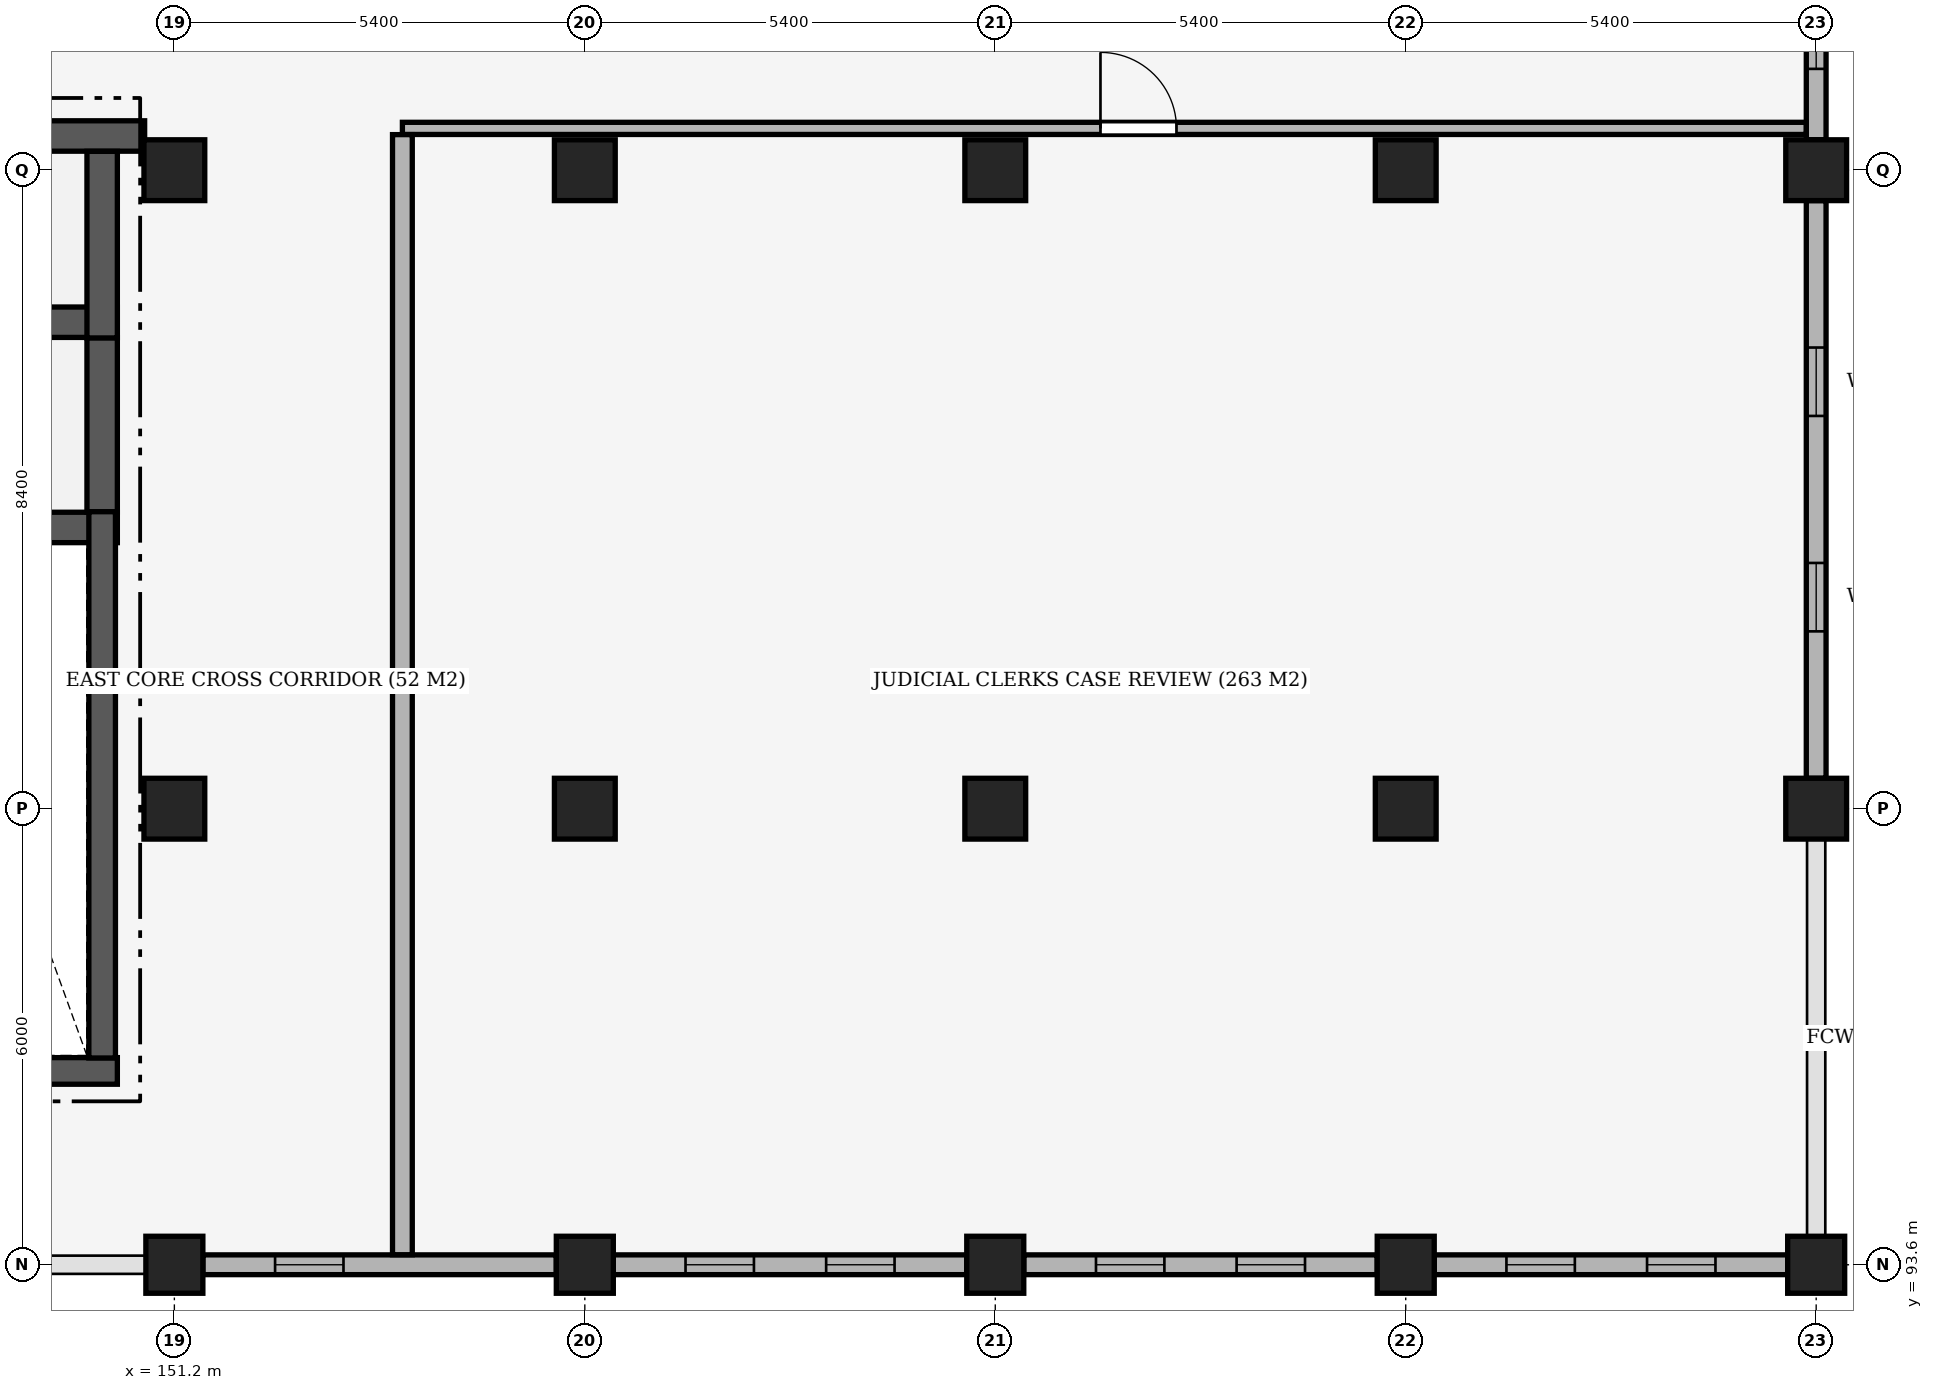
"""IFC4 building model, lengths in metres.
Left out: names, types, materials, properties, quantities, classifications, styles, units other than length and angle.
Written with IfcOpenShell. Run it as: python <this file> out.ifc"""

import sys

from ifc_helpers import new_model, si_unit, direction, frame, frame_2d, origin, origin_2d, place, context, subcontext, project, spatial, rectangle, extrude, element, fill, save


model = new_model("IFC4")
c1 = context("Model", 3, precision=1e-05, world=origin(), true_north=direction((0.0, 1.0)))
c2 = subcontext(c1, "Body", "Model", "MODEL_VIEW")
j1 = project(units=[si_unit("LENGTHUNIT", "METRE"), si_unit("PLANEANGLEUNIT", "RADIAN")], contexts=[c1])
p1 = place(None, origin())
s1 = spatial("IfcSite", under=j1, at=p1, CompositionType="ELEMENT")
p2 = place(p1, origin())
s2 = spatial("IfcBuilding", under=s1, at=p2, CompositionType="ELEMENT")
p3 = place(p2, frame((0.0, 0.0, 15.3)))
s3 = spatial("IfcBuildingStorey", under=s2, at=p3, CompositionType="ELEMENT", Elevation=15.3)
p4 = place(p3, frame((151.2, 93.6, 0.0), z_axis=(0.0, 0.0, 1.0), x_axis=(1.0, 0.0, 0.0)))
e1 = element("IfcColumn", 1, at=p4, inside=s3, PredefinedType="COLUMN", context=c2, shape_type="SweptSolid", body=[
    extrude(rectangle(XDim=0.75, YDim=0.75, at=origin_2d()), origin(), (0.0, 0.0, 1.0), 5.1),
])
for number, where, z_axis, x_axis in (
    (2, (151.2, 99.6, 0.0), (0.0, 0.0, 1.0), (1.0, 0.0, 0.0)),
    (3, (151.2, 108.0, 0.0), (0.0, 0.0, 1.0), (1.0, 0.0, 0.0)),
):
    element("IfcColumn", number, at=place(p3, frame(where, z_axis=z_axis, x_axis=x_axis)), inside=s3, PredefinedType="COLUMN", context=c2, shape_type="SweptSolid", body=[
        extrude(rectangle(XDim=0.8, YDim=0.8, at=origin_2d()), origin(), (0.0, 0.0, 1.0), 5.1),
    ])
p5 = place(p3, frame((156.6, 93.6, 0.0), z_axis=(0.0, 0.0, 1.0), x_axis=(1.0, 0.0, 0.0)))
e4 = element("IfcColumn", 4, at=p5, inside=s3, PredefinedType="COLUMN", context=c2, shape_type="SweptSolid", body=[
    extrude(rectangle(XDim=0.75, YDim=0.75, at=origin_2d()), origin(), (0.0, 0.0, 1.0), 5.1),
])
for number, where, z_axis, x_axis in (
    (5, (156.6, 99.6, 0.0), (0.0, 0.0, 1.0), (1.0, 0.0, 0.0)),
    (6, (156.6, 108.0, 0.0), (0.0, 0.0, 1.0), (1.0, 0.0, 0.0)),
):
    element("IfcColumn", number, at=place(p3, frame(where, z_axis=z_axis, x_axis=x_axis)), inside=s3, PredefinedType="COLUMN", context=c2, shape_type="SweptSolid", body=[
        extrude(rectangle(XDim=0.8, YDim=0.8, at=origin_2d()), origin(), (0.0, 0.0, 1.0), 5.1),
    ])
p6 = place(p3, frame((162.0, 93.6, 0.0), z_axis=(0.0, 0.0, 1.0), x_axis=(1.0, 0.0, 0.0)))
e7 = element("IfcColumn", 7, at=p6, inside=s3, PredefinedType="COLUMN", context=c2, shape_type="SweptSolid", body=[
    extrude(rectangle(XDim=0.75, YDim=0.75, at=origin_2d()), origin(), (0.0, 0.0, 1.0), 5.1),
])
for number, where, z_axis, x_axis in (
    (8, (162.0, 99.6, 0.0), (0.0, 0.0, 1.0), (1.0, 0.0, 0.0)),
    (9, (162.0, 108.0, 0.0), (0.0, 0.0, 1.0), (1.0, 0.0, 0.0)),
):
    element("IfcColumn", number, at=place(p3, frame(where, z_axis=z_axis, x_axis=x_axis)), inside=s3, PredefinedType="COLUMN", context=c2, shape_type="SweptSolid", body=[
        extrude(rectangle(XDim=0.8, YDim=0.8, at=origin_2d()), origin(), (0.0, 0.0, 1.0), 5.1),
    ])
p7 = place(p3, frame((167.4, 93.6, 0.0), z_axis=(0.0, 0.0, 1.0), x_axis=(1.0, 0.0, 0.0)))
e10 = element("IfcColumn", 10, at=p7, inside=s3, PredefinedType="COLUMN", context=c2, shape_type="SweptSolid", body=[
    extrude(rectangle(XDim=0.75, YDim=0.75, at=origin_2d()), origin(), (0.0, 0.0, 1.0), 5.1),
])
for number, where, z_axis, x_axis in (
    (11, (167.4, 99.6, 0.0), (0.0, 0.0, 1.0), (1.0, 0.0, 0.0)),
    (12, (167.4, 108.0, 0.0), (0.0, 0.0, 1.0), (1.0, 0.0, 0.0)),
):
    element("IfcColumn", number, at=place(p3, frame(where, z_axis=z_axis, x_axis=x_axis)), inside=s3, PredefinedType="COLUMN", context=c2, shape_type="SweptSolid", body=[
        extrude(rectangle(XDim=0.8, YDim=0.8, at=origin_2d()), origin(), (0.0, 0.0, 1.0), 5.1),
    ])
p8 = place(p3, frame((172.8, 93.6, 0.0), z_axis=(0.0, 0.0, 1.0), x_axis=(1.0, 0.0, 0.0)))
e13 = element("IfcColumn", 13, at=p8, inside=s3, PredefinedType="COLUMN", context=c2, shape_type="SweptSolid", body=[
    extrude(rectangle(XDim=0.75, YDim=0.75, at=origin_2d()), origin(), (0.0, 0.0, 1.0), 5.1),
])
for number, where, z_axis, x_axis in (
    (14, (172.8, 99.6, 0.0), (0.0, 0.0, 1.0), (1.0, 0.0, 0.0)),
    (15, (172.8, 108.0, 0.0), (0.0, 0.0, 1.0), (1.0, 0.0, 0.0)),
):
    element("IfcColumn", number, at=place(p3, frame(where, z_axis=z_axis, x_axis=x_axis)), inside=s3, PredefinedType="COLUMN", context=c2, shape_type="SweptSolid", body=[
        extrude(rectangle(XDim=0.8, YDim=0.8, at=origin_2d()), origin(), (0.0, 0.0, 1.0), 5.1),
    ])
p9 = place(p3, frame((172.8, 113.0, 0.0), z_axis=(0.0, 0.0, 1.0), x_axis=(0.0, -1.0, 0.0)))
e16 = element("IfcWall", 16, at=p9, inside=s3, PredefinedType="SOLIDWALL", context=c2, shape_type="SweptSolid", body=[
    extrude(rectangle(XDim=4.6, YDim=0.26, at=frame_2d((2.3, 0.0))), origin(), (0.0, 0.0, 1.0), 4.29),
])
p10 = place(p9, frame((0.933, 0.0, 0.9)))
e17 = element("IfcOpeningElement", 17, at=p10, cuts=e16, PredefinedType="OPENING", context=c2, shape_type="SweptSolid", body=[
    extrude(rectangle(XDim=0.9, YDim=2.2, at=frame_2d((0.45, 1.1))), frame((0.0, 0.145, 0.0), z_axis=(0.0, -1.0, 0.0), x_axis=(1.0, 0.0, 0.0)), (0.0, 0.0, 1.0), 0.29),
])
p11 = place(p9, frame((2.767, 0.0, 0.9)))
e18 = element("IfcOpeningElement", 18, at=p11, cuts=e16, PredefinedType="OPENING", context=c2, shape_type="SweptSolid", body=[
    extrude(rectangle(XDim=0.9, YDim=2.2, at=frame_2d((0.45, 1.1))), frame((0.0, 0.145, 0.0), z_axis=(0.0, -1.0, 0.0), x_axis=(1.0, 0.0, 0.0)), (0.0, 0.0, 1.0), 0.29),
])
p12 = place(p3, frame((172.8, 107.6, 0.0), z_axis=(0.0, 0.0, 1.0), x_axis=(0.0, -1.0, 0.0)))
e19 = element("IfcWall", 19, at=p12, inside=s3, PredefinedType="SOLIDWALL", context=c2, shape_type="SweptSolid", body=[
    extrude(rectangle(XDim=7.6, YDim=0.26, at=frame_2d((3.8, 0.0))), origin(), (0.0, 0.0, 1.0), 4.14),
])
p13 = place(p12, frame((1.933, 0.0, 0.9)))
e20 = element("IfcOpeningElement", 20, at=p13, cuts=e19, PredefinedType="OPENING", context=c2, shape_type="SweptSolid", body=[
    extrude(rectangle(XDim=0.9, YDim=2.2, at=frame_2d((0.45, 1.1))), frame((0.0, 0.145, 0.0), z_axis=(0.0, -1.0, 0.0), x_axis=(1.0, 0.0, 0.0)), (0.0, 0.0, 1.0), 0.29),
])
p14 = place(p12, frame((4.767, 0.0, 0.9)))
e21 = element("IfcOpeningElement", 21, at=p14, cuts=e19, PredefinedType="OPENING", context=c2, shape_type="SweptSolid", body=[
    extrude(rectangle(XDim=0.9, YDim=2.2, at=frame_2d((0.45, 1.1))), frame((0.0, 0.145, 0.0), z_axis=(0.0, -1.0, 0.0), x_axis=(1.0, 0.0, 0.0)), (0.0, 0.0, 1.0), 0.29),
])
p15 = place(p3, frame((172.425, 93.6, 0.0), z_axis=(0.0, 0.0, 1.0), x_axis=(-1.0, 0.0, 0.0)))
e22 = element("IfcWall", 22, at=p15, inside=s3, PredefinedType="SOLIDWALL", context=c2, shape_type="SweptSolid", body=[
    extrude(rectangle(XDim=4.65, YDim=0.26, at=frame_2d((2.325, 0.0))), origin(), (0.0, 0.0, 1.0), 4.24),
])
p16 = place(p15, frame((0.95, 0.0, 0.9)))
e23 = element("IfcOpeningElement", 23, at=p16, cuts=e22, PredefinedType="OPENING", context=c2, shape_type="SweptSolid", body=[
    extrude(rectangle(XDim=0.9, YDim=2.2, at=frame_2d((0.45, 1.1))), frame((0.0, 0.145, 0.0), z_axis=(0.0, -1.0, 0.0), x_axis=(1.0, 0.0, 0.0)), (0.0, 0.0, 1.0), 0.29),
])
p17 = place(p15, frame((2.8, 0.0, 0.9)))
e24 = element("IfcOpeningElement", 24, at=p17, cuts=e22, PredefinedType="OPENING", context=c2, shape_type="SweptSolid", body=[
    extrude(rectangle(XDim=0.9, YDim=2.2, at=frame_2d((0.45, 1.1))), frame((0.0, 0.145, 0.0), z_axis=(0.0, -1.0, 0.0), x_axis=(1.0, 0.0, 0.0)), (0.0, 0.0, 1.0), 0.29),
])
p18 = place(p3, frame((167.025, 93.6, 0.0), z_axis=(0.0, 0.0, 1.0), x_axis=(-1.0, 0.0, 0.0)))
e25 = element("IfcWall", 25, at=p18, inside=s3, PredefinedType="SOLIDWALL", context=c2, shape_type="SweptSolid", body=[
    extrude(rectangle(XDim=4.65, YDim=0.26, at=frame_2d((2.325, 0.0))), origin(), (0.0, 0.0, 1.0), 4.24),
])
p19 = place(p18, frame((0.95, 0.0, 0.9)))
e26 = element("IfcOpeningElement", 26, at=p19, cuts=e25, PredefinedType="OPENING", context=c2, shape_type="SweptSolid", body=[
    extrude(rectangle(XDim=0.9, YDim=2.2, at=frame_2d((0.45, 1.1))), frame((0.0, 0.145, 0.0), z_axis=(0.0, -1.0, 0.0), x_axis=(1.0, 0.0, 0.0)), (0.0, 0.0, 1.0), 0.29),
])
p20 = place(p18, frame((2.8, 0.0, 0.9)))
e27 = element("IfcOpeningElement", 27, at=p20, cuts=e25, PredefinedType="OPENING", context=c2, shape_type="SweptSolid", body=[
    extrude(rectangle(XDim=0.9, YDim=2.2, at=frame_2d((0.45, 1.1))), frame((0.0, 0.145, 0.0), z_axis=(0.0, -1.0, 0.0), x_axis=(1.0, 0.0, 0.0)), (0.0, 0.0, 1.0), 0.29),
])
p21 = place(p3, frame((161.625, 93.6, 0.0), z_axis=(0.0, 0.0, 1.0), x_axis=(-1.0, 0.0, 0.0)))
e28 = element("IfcWall", 28, at=p21, inside=s3, PredefinedType="SOLIDWALL", context=c2, shape_type="SweptSolid", body=[
    extrude(rectangle(XDim=4.65, YDim=0.26, at=frame_2d((2.325, 0.0))), origin(), (0.0, 0.0, 1.0), 4.24),
])
p22 = place(p21, frame((0.95, 0.0, 0.9)))
e29 = element("IfcOpeningElement", 29, at=p22, cuts=e28, PredefinedType="OPENING", context=c2, shape_type="SweptSolid", body=[
    extrude(rectangle(XDim=0.9, YDim=2.2, at=frame_2d((0.45, 1.1))), frame((0.0, 0.145, 0.0), z_axis=(0.0, -1.0, 0.0), x_axis=(1.0, 0.0, 0.0)), (0.0, 0.0, 1.0), 0.29),
])
p23 = place(p21, frame((2.8, 0.0, 0.9)))
e30 = element("IfcOpeningElement", 30, at=p23, cuts=e28, PredefinedType="OPENING", context=c2, shape_type="SweptSolid", body=[
    extrude(rectangle(XDim=0.9, YDim=2.2, at=frame_2d((0.45, 1.1))), frame((0.0, 0.145, 0.0), z_axis=(0.0, -1.0, 0.0), x_axis=(1.0, 0.0, 0.0)), (0.0, 0.0, 1.0), 0.29),
])
p24 = place(p3, frame((156.225, 93.6, 0.0), z_axis=(0.0, 0.0, 1.0), x_axis=(-1.0, 0.0, 0.0)))
e31 = element("IfcWall", 31, at=p24, inside=s3, PredefinedType="SOLIDWALL", context=c2, shape_type="SweptSolid", body=[
    extrude(rectangle(XDim=4.65, YDim=0.26, at=frame_2d((2.325, 0.0))), origin(), (0.0, 0.0, 1.0), 4.24),
])
p25 = place(p24, frame((2.8, 0.0, 0.9)))
e32 = element("IfcOpeningElement", 32, at=p25, cuts=e31, PredefinedType="OPENING", context=c2, shape_type="SweptSolid", body=[
    extrude(rectangle(XDim=0.9, YDim=2.2, at=frame_2d((0.45, 1.1))), frame((0.0, 0.145, 0.0), z_axis=(0.0, -1.0, 0.0), x_axis=(1.0, 0.0, 0.0)), (0.0, 0.0, 1.0), 0.29),
])
p26 = place(p3, frame((147.543, 103.3, 0.0), z_axis=(0.0, 0.0, 1.0), x_axis=(1.0, 0.0, 0.0)))
e33 = element("IfcWall", 33, at=p26, inside=s3, PredefinedType="SHEAR", context=c2, shape_type="SweptSolid", body=[
    extrude(rectangle(XDim=2.907, YDim=0.4, at=frame_2d((1.454, 0.0))), origin(), (0.0, 0.0, 1.0), 4.84),
])
p27 = place(p3, frame((147.15, 106.0, 0.0), z_axis=(0.0, 0.0, 1.0), x_axis=(1.0, 0.0, 0.0)))
e34 = element("IfcWall", 34, at=p27, inside=s3, PredefinedType="SHEAR", context=c2, shape_type="SweptSolid", body=[
    extrude(rectangle(XDim=3.3, YDim=0.4, at=frame_2d((1.65, 0.0))), origin(), (0.0, 0.0, 1.0), 4.84),
])
p28 = place(p3, frame((150.25, 103.502, 0.0), z_axis=(0.0, 0.0, 1.0), x_axis=(0.0, 1.0, 0.0)))
e35 = element("IfcWall", 35, at=p28, inside=s3, PredefinedType="SHEAR", context=c2, shape_type="SweptSolid", body=[
    extrude(rectangle(XDim=2.296, YDim=0.4, at=frame_2d((1.148, 0.0))), origin(), (0.0, 0.0, 1.0), 4.84),
])
p29 = place(p3, frame((147.15, 108.45, 0.0), z_axis=(0.0, 0.0, 1.0), x_axis=(1.0, 0.0, 0.0)))
e36 = element("IfcWall", 36, at=p29, inside=s3, PredefinedType="SHEAR", context=c2, shape_type="SweptSolid", body=[
    extrude(rectangle(XDim=3.659, YDim=0.4, at=frame_2d((1.83, 0.0))), origin(), (0.0, 0.0, 1.0), 4.84),
])
p30 = place(p3, frame((150.25, 105.793, 0.0), z_axis=(0.0, 0.0, 1.0), x_axis=(0.0, 1.0, 0.0)))
e37 = element("IfcWall", 37, at=p30, inside=s3, PredefinedType="SHEAR", context=c2, shape_type="SweptSolid", body=[
    extrude(rectangle(XDim=2.455, YDim=0.4, at=frame_2d((1.228, 0.0))), origin(), (0.0, 0.0, 1.0), 4.84),
])
p31 = place(p3, frame((147.6, 96.15, 0.0), z_axis=(0.0, 0.0, 1.0), x_axis=(1.0, 0.0, 0.0)))
e38 = element("IfcWall", 38, at=p31, inside=s3, PredefinedType="SHEAR", context=c2, shape_type="SweptSolid", body=[
    extrude(rectangle(XDim=2.85, YDim=0.35, at=frame_2d((1.425, 0.0))), origin(), (0.0, 0.0, 1.0), 4.84),
])
p32 = place(p3, frame((150.25, 96.32, 0.0), z_axis=(0.0, 0.0, 1.0), x_axis=(0.0, 1.0, 0.0)))
e39 = element("IfcWall", 39, at=p32, inside=s3, PredefinedType="SHEAR", context=c2, shape_type="SweptSolid", body=[
    extrude(rectangle(XDim=7.187, YDim=0.35, at=frame_2d((3.594, 0.0))), origin(), (0.0, 0.0, 1.0), 4.84),
])
p33 = place(p3, frame((154.2, 108.55, 0.0), z_axis=(0.0, 0.0, 1.0), x_axis=(1.0, 0.0, 0.0)))
e40 = element("IfcWall", 40, at=p33, inside=s3, PredefinedType="PARTITIONING", context=c2, shape_type="SweptSolid", body=[
    extrude(rectangle(XDim=18.468, YDim=0.16, at=frame_2d((9.234, 0.0))), origin(), (0.0, 0.0, 1.0), 4.29),
])
p34 = place(p33, frame((9.184, 0.0, 0.0)))
e41 = element("IfcOpeningElement", 41, at=p34, cuts=e40, PredefinedType="OPENING", context=c2, shape_type="SweptSolid", body=[
    extrude(rectangle(XDim=1.0, YDim=2.2, at=frame_2d((0.5, 1.1))), frame((0.0, 0.095, 0.0), z_axis=(0.0, -1.0, 0.0), x_axis=(1.0, 0.0, 0.0)), (0.0, 0.0, 1.0), 0.19),
])
p35 = place(p3, frame((154.2, 93.732, 0.0), z_axis=(0.0, 0.0, 1.0), x_axis=(0.0, 1.0, 0.0)))
e42 = element("IfcWall", 42, at=p35, inside=s3, PredefinedType="PARTITIONING", context=c2, shape_type="SweptSolid", body=[
    extrude(rectangle(XDim=14.736, YDim=0.26, at=frame_2d((7.368, 0.0))), origin(), (0.0, 0.0, 1.0), 4.24),
])
p36 = place(p11, origin())
e43 = element("IfcWindow", 43, at=p36, inside=s3, PartitioningType="SINGLE_PANEL", PredefinedType="WINDOW", context=c2, shape_type="SweptSolid", body=[
    extrude(rectangle(XDim=0.9, YDim=2.2, at=frame_2d((0.45, 1.1))), frame((0.0, 0.03, 0.0), z_axis=(0.0, -1.0, 0.0), x_axis=(1.0, 0.0, 0.0)), (0.0, 0.0, 1.0), 0.06),
])
fill(e18, e43)
p37 = place(p13, origin())
e44 = element("IfcWindow", 44, at=p37, inside=s3, PartitioningType="SINGLE_PANEL", PredefinedType="WINDOW", context=c2, shape_type="SweptSolid", body=[
    extrude(rectangle(XDim=0.9, YDim=2.2, at=frame_2d((0.45, 1.1))), frame((0.0, 0.03, 0.0), z_axis=(0.0, -1.0, 0.0), x_axis=(1.0, 0.0, 0.0)), (0.0, 0.0, 1.0), 0.06),
])
fill(e20, e44)
p38 = place(p14, origin())
e45 = element("IfcWindow", 45, at=p38, inside=s3, PartitioningType="SINGLE_PANEL", PredefinedType="WINDOW", context=c2, shape_type="SweptSolid", body=[
    extrude(rectangle(XDim=0.9, YDim=2.2, at=frame_2d((0.45, 1.1))), frame((0.0, 0.03, 0.0), z_axis=(0.0, -1.0, 0.0), x_axis=(1.0, 0.0, 0.0)), (0.0, 0.0, 1.0), 0.06),
])
fill(e21, e45)
p39 = place(p16, origin())
e46 = element("IfcWindow", 46, at=p39, inside=s3, PartitioningType="SINGLE_PANEL", PredefinedType="WINDOW", context=c2, shape_type="SweptSolid", body=[
    extrude(rectangle(XDim=0.9, YDim=2.2, at=frame_2d((0.45, 1.1))), frame((0.0, 0.03, 0.0), z_axis=(0.0, -1.0, 0.0), x_axis=(1.0, 0.0, 0.0)), (0.0, 0.0, 1.0), 0.06),
])
fill(e23, e46)
p40 = place(p17, origin())
e47 = element("IfcWindow", 47, at=p40, inside=s3, PartitioningType="SINGLE_PANEL", PredefinedType="WINDOW", context=c2, shape_type="SweptSolid", body=[
    extrude(rectangle(XDim=0.9, YDim=2.2, at=frame_2d((0.45, 1.1))), frame((0.0, 0.03, 0.0), z_axis=(0.0, -1.0, 0.0), x_axis=(1.0, 0.0, 0.0)), (0.0, 0.0, 1.0), 0.06),
])
fill(e24, e47)
p41 = place(p19, origin())
e48 = element("IfcWindow", 48, at=p41, inside=s3, PartitioningType="SINGLE_PANEL", PredefinedType="WINDOW", context=c2, shape_type="SweptSolid", body=[
    extrude(rectangle(XDim=0.9, YDim=2.2, at=frame_2d((0.45, 1.1))), frame((0.0, 0.03, 0.0), z_axis=(0.0, -1.0, 0.0), x_axis=(1.0, 0.0, 0.0)), (0.0, 0.0, 1.0), 0.06),
])
fill(e26, e48)
p42 = place(p20, origin())
e49 = element("IfcWindow", 49, at=p42, inside=s3, PartitioningType="SINGLE_PANEL", PredefinedType="WINDOW", context=c2, shape_type="SweptSolid", body=[
    extrude(rectangle(XDim=0.9, YDim=2.2, at=frame_2d((0.45, 1.1))), frame((0.0, 0.03, 0.0), z_axis=(0.0, -1.0, 0.0), x_axis=(1.0, 0.0, 0.0)), (0.0, 0.0, 1.0), 0.06),
])
fill(e27, e49)
p43 = place(p22, origin())
e50 = element("IfcWindow", 50, at=p43, inside=s3, PartitioningType="SINGLE_PANEL", PredefinedType="WINDOW", context=c2, shape_type="SweptSolid", body=[
    extrude(rectangle(XDim=0.9, YDim=2.2, at=frame_2d((0.45, 1.1))), frame((0.0, 0.03, 0.0), z_axis=(0.0, -1.0, 0.0), x_axis=(1.0, 0.0, 0.0)), (0.0, 0.0, 1.0), 0.06),
])
fill(e29, e50)
p44 = place(p23, origin())
e51 = element("IfcWindow", 51, at=p44, inside=s3, PartitioningType="SINGLE_PANEL", PredefinedType="WINDOW", context=c2, shape_type="SweptSolid", body=[
    extrude(rectangle(XDim=0.9, YDim=2.2, at=frame_2d((0.45, 1.1))), frame((0.0, 0.03, 0.0), z_axis=(0.0, -1.0, 0.0), x_axis=(1.0, 0.0, 0.0)), (0.0, 0.0, 1.0), 0.06),
])
fill(e30, e51)
p45 = place(p25, origin())
e52 = element("IfcWindow", 52, at=p45, inside=s3, PartitioningType="SINGLE_PANEL", PredefinedType="WINDOW", context=c2, shape_type="SweptSolid", body=[
    extrude(rectangle(XDim=0.9, YDim=2.2, at=frame_2d((0.45, 1.1))), frame((0.0, 0.03, 0.0), z_axis=(0.0, -1.0, 0.0), x_axis=(1.0, 0.0, 0.0)), (0.0, 0.0, 1.0), 0.06),
])
fill(e32, e52)
p46 = place(p34, origin())
e53 = element("IfcDoor", 53, at=p46, inside=s3, OperationType="SINGLE_SWING_LEFT", PredefinedType="DOOR", context=c2, shape_type="SweptSolid", body=[
    extrude(rectangle(XDim=1.0, YDim=2.2, at=frame_2d((0.5, 1.1))), frame((0.0, 0.025, 0.0), z_axis=(0.0, -1.0, 0.0), x_axis=(1.0, 0.0, 0.0)), (0.0, 0.0, 1.0), 0.05),
])
fill(e41, e53)
save(model, sys.argv[1])
